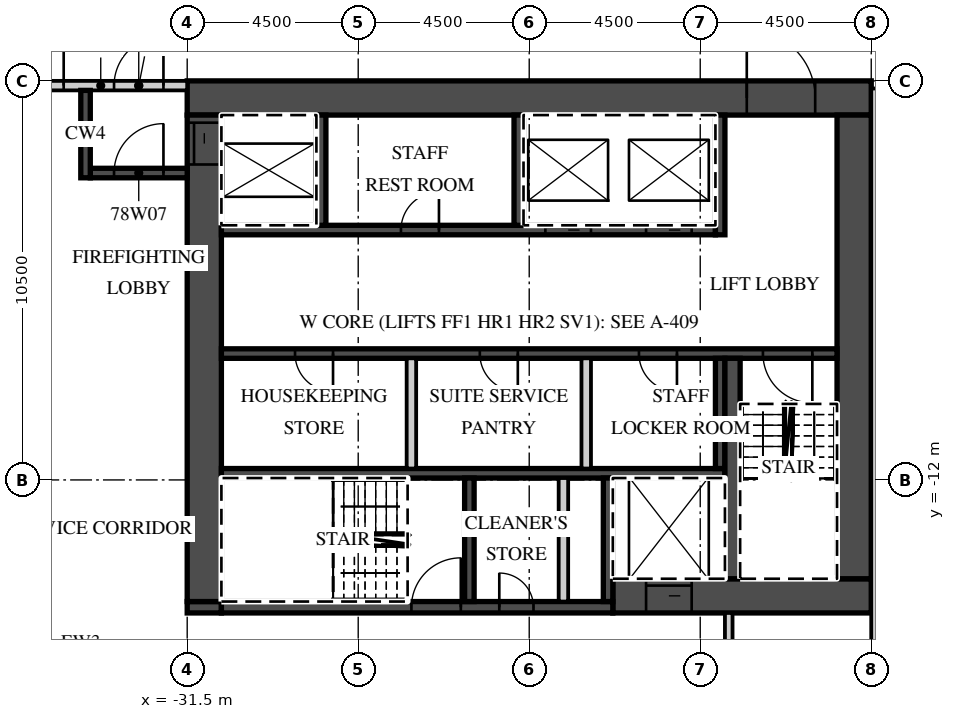
"""IFC4 building model, lengths in metres.
Left out: names, types, materials, properties, quantities, classifications, styles, units other than length and angle.
Written with IfcOpenShell. Run it as: python <this file> out.ifc"""

import sys

from ifc_helpers import new_model, si_unit, direction, frame, frame_2d, origin, place, context, subcontext, project, spatial, rectangle, extrude, element, fill, save


model = new_model("IFC4")
c1 = context("Model", 3, precision=1e-05, world=origin(), true_north=direction((0.0, 1.0)))
c2 = subcontext(c1, "Body", "Model", "MODEL_VIEW")
j1 = project(units=[si_unit("LENGTHUNIT", "METRE"), si_unit("PLANEANGLEUNIT", "RADIAN")], contexts=[c1])
p1 = place(None, origin())
s1 = spatial("IfcSite", under=j1, at=p1, CompositionType="ELEMENT")
p2 = place(p1, origin())
s2 = spatial("IfcBuilding", under=s1, at=p2, CompositionType="ELEMENT")
p3 = place(p2, frame((0.0, 0.0, 308.1)))
s3 = spatial("IfcBuildingStorey", under=s2, at=p3, CompositionType="ELEMENT", Elevation=308.1)
p4 = place(p3, frame((-31.5, -1.95, 0.0), z_axis=(0.0, 0.0, 1.0), x_axis=(1.0, 0.0, 0.0)))
e1 = element("IfcWall", 1, at=p4, inside=s3, PredefinedType="SHEAR", context=c2, shape_type="SweptSolid", body=[
    extrude(rectangle(XDim=18.0, YDim=0.9, at=frame_2d((9.0, 0.0))), origin(), (0.0, 0.0, 1.0), 5.1),
])
p5 = place(p4, frame((14.725, 0.0, 0.0)))
e2 = element("IfcOpeningElement", 2, at=p5, cuts=e1, PredefinedType="OPENING", context=c2, shape_type="SweptSolid", body=[
    extrude(rectangle(XDim=1.8, YDim=2.1, at=frame_2d((0.9, 1.05))), frame((0.0, 0.46, 0.0), z_axis=(0.0, -1.0, 0.0), x_axis=(1.0, 0.0, 0.0)), (0.0, 0.0, 1.0), 0.92),
])
p6 = place(p3, frame((-20.3, -15.05, 0.0), z_axis=(0.0, 0.0, 1.0), x_axis=(1.0, 0.0, 0.0)))
e3 = element("IfcWall", 3, at=p6, inside=s3, PredefinedType="SHEAR", context=c2, shape_type="SweptSolid", body=[
    extrude(rectangle(XDim=6.8, YDim=0.9, at=frame_2d((3.4, 0.0))), origin(), (0.0, 0.0, 1.0), 5.1),
])
p7 = place(p6, frame((0.875, 0.0, 0.0)))
e4 = element("IfcOpeningElement", 4, at=p7, cuts=e3, PredefinedType="OPENING", context=c2, shape_type="SweptSolid", body=[
    extrude(rectangle(XDim=1.2, YDim=2.1, at=frame_2d((0.6, 1.05))), frame((0.0, 0.46, 0.0), z_axis=(0.0, -1.0, 0.0), x_axis=(1.0, 0.0, 0.0)), (0.0, 0.0, 1.0), 0.92),
])
p8 = place(p3, frame((-31.5, -15.35, 0.0), z_axis=(0.0, 0.0, 1.0), x_axis=(1.0, 0.0, 0.0)))
e5 = element("IfcWall", 5, at=p8, inside=s3, PredefinedType="SHEAR", context=c2, shape_type="SweptSolid", body=[
    extrude(rectangle(XDim=0.9, YDim=0.3, at=frame_2d((0.45, 0.0))), origin(), (0.0, 0.0, 1.0), 5.1),
])
p9 = place(p3, frame((-30.6, -15.35, 0.0), z_axis=(0.0, 0.0, 1.0), x_axis=(1.0, 0.0, 0.0)))
e6 = element("IfcWall", 6, at=p9, inside=s3, PredefinedType="SHEAR", context=c2, shape_type="SweptSolid", body=[
    extrude(rectangle(XDim=10.3, YDim=0.3, at=frame_2d((5.15, 0.0))), origin(), (0.0, 0.0, 1.0), 5.1),
])
p10 = place(p9, frame((5.0, 0.0, 0.0)))
e7 = element("IfcOpeningElement", 7, at=p10, cuts=e6, PredefinedType="OPENING", context=c2, shape_type="SweptSolid", body=[
    extrude(rectangle(XDim=1.3, YDim=2.1, at=frame_2d((0.65, 1.05))), frame((0.0, 0.16, 0.0), z_axis=(0.0, -1.0, 0.0), x_axis=(1.0, 0.0, 0.0)), (0.0, 0.0, 1.0), 0.32),
])
p11 = place(p9, frame((7.312, 0.0, 0.0)))
e8 = element("IfcOpeningElement", 8, at=p11, cuts=e6, PredefinedType="OPENING", context=c2, shape_type="SweptSolid", body=[
    extrude(rectangle(XDim=0.9, YDim=2.1, at=frame_2d((0.45, 1.05))), frame((0.0, 0.16, 0.0), z_axis=(0.0, -1.0, 0.0), x_axis=(1.0, 0.0, 0.0)), (0.0, 0.0, 1.0), 0.32),
])
p12 = place(p3, frame((-31.05, -15.2, 0.0), z_axis=(0.0, 0.0, 1.0), x_axis=(0.0, 1.0, 0.0)))
e9 = element("IfcWall", 9, at=p12, inside=s3, PredefinedType="SHEAR", context=c2, shape_type="SweptSolid", body=[
    extrude(rectangle(XDim=12.8, YDim=0.9, at=frame_2d((6.4, 0.0))), origin(), (0.0, 0.0, 1.0), 5.1),
])
p13 = place(p12, frame((11.5, 0.0, 0.0)))
e10 = element("IfcOpeningElement", 10, at=p13, cuts=e9, PredefinedType="OPENING", context=c2, shape_type="SweptSolid", body=[
    extrude(rectangle(XDim=1.1, YDim=2.1, at=frame_2d((0.55, 1.05))), frame((0.0, 0.46, 0.0), z_axis=(0.0, -1.0, 0.0), x_axis=(1.0, 0.0, 0.0)), (0.0, 0.0, 1.0), 0.92),
])
p14 = place(p3, frame((-13.95, -14.6, 0.0), z_axis=(0.0, 0.0, 1.0), x_axis=(0.0, 1.0, 0.0)))
e11 = element("IfcWall", 11, at=p14, inside=s3, PredefinedType="SHEAR", context=c2, shape_type="SweptSolid", body=[
    extrude(rectangle(XDim=12.2, YDim=0.9, at=frame_2d((6.1, 0.0))), origin(), (0.0, 0.0, 1.0), 5.1),
])
p15 = place(p3, frame((-30.6, -5.425, 0.0), z_axis=(0.0, 0.0, 1.0), x_axis=(1.0, 0.0, 0.0)))
e12 = element("IfcWall", 12, at=p15, inside=s3, PredefinedType="SHEAR", context=c2, shape_type="SweptSolid", body=[
    extrude(rectangle(XDim=13.0, YDim=0.25, at=frame_2d((6.5, 0.0))), origin(), (0.0, 0.0, 1.0), 5.1),
])
p16 = place(p15, frame((8.525, 0.0, 0.0)))
e13 = element("IfcOpeningElement", 13, at=p16, cuts=e12, PredefinedType="OPENING", context=c2, shape_type="SweptSolid", body=[
    extrude(rectangle(XDim=1.2, YDim=2.1, at=frame_2d((0.6, 1.05))), frame((0.0, 0.135, 0.0), z_axis=(0.0, -1.0, 0.0), x_axis=(1.0, 0.0, 0.0)), (0.0, 0.0, 1.0), 0.27),
])
p17 = place(p15, frame((11.175, 0.0, 0.0)))
e14 = element("IfcOpeningElement", 14, at=p17, cuts=e12, PredefinedType="OPENING", context=c2, shape_type="SweptSolid", body=[
    extrude(rectangle(XDim=1.2, YDim=2.1, at=frame_2d((0.6, 1.05))), frame((0.0, 0.135, 0.0), z_axis=(0.0, -1.0, 0.0), x_axis=(1.0, 0.0, 0.0)), (0.0, 0.0, 1.0), 0.27),
])
p18 = place(p15, frame((4.725, 0.0, 0.0)))
e15 = element("IfcOpeningElement", 15, at=p18, cuts=e12, PredefinedType="OPENING", context=c2, shape_type="SweptSolid", body=[
    extrude(rectangle(XDim=1.0, YDim=2.1, at=frame_2d((0.5, 1.05))), frame((0.0, 0.135, 0.0), z_axis=(0.0, -1.0, 0.0), x_axis=(1.0, 0.0, 0.0)), (0.0, 0.0, 1.0), 0.27),
])
p19 = place(p3, frame((-17.475, -5.55, 0.0), z_axis=(0.0, 0.0, 1.0), x_axis=(0.0, 1.0, 0.0)))
e16 = element("IfcWall", 16, at=p19, inside=s3, PredefinedType="SHEAR", context=c2, shape_type="SweptSolid", body=[
    extrude(rectangle(XDim=3.15, YDim=0.25, at=frame_2d((1.575, 0.0))), origin(), (0.0, 0.0, 1.0), 5.1),
])
for number, where, z_axis, x_axis in (
    (17, (-27.975, -5.3, 0.0), (0.0, 0.0, 1.0), (0.0, 1.0, 0.0)),
    (18, (-22.775, -5.3, 0.0), (0.0, 0.0, 1.0), (0.0, 1.0, 0.0)),
):
    element("IfcWall", number, at=place(p3, frame(where, z_axis=z_axis, x_axis=x_axis)), inside=s3, PredefinedType="SHEAR", context=c2, shape_type="SweptSolid", body=[
        extrude(rectangle(XDim=2.9, YDim=0.25, at=frame_2d((1.45, 0.0))), origin(), (0.0, 0.0, 1.0), 5.1),
    ])
p20 = place(p3, frame((-30.6, -8.675, 0.0), z_axis=(0.0, 0.0, 1.0), x_axis=(1.0, 0.0, 0.0)))
e19 = element("IfcWall", 19, at=p20, inside=s3, PredefinedType="SHEAR", context=c2, shape_type="SweptSolid", body=[
    extrude(rectangle(XDim=16.2, YDim=0.25, at=frame_2d((8.1, 0.0))), origin(), (0.0, 0.0, 1.0), 5.1),
])
p21 = place(p20, frame((14.25, 0.0, 0.0)))
e20 = element("IfcOpeningElement", 20, at=p21, cuts=e19, PredefinedType="OPENING", context=c2, shape_type="SweptSolid", body=[
    extrude(rectangle(XDim=1.3, YDim=2.1, at=frame_2d((0.65, 1.05))), frame((0.0, 0.135, 0.0), z_axis=(0.0, -1.0, 0.0), x_axis=(1.0, 0.0, 0.0)), (0.0, 0.0, 1.0), 0.27),
])
p22 = place(p20, frame((1.938, 0.0, 0.0)))
e21 = element("IfcOpeningElement", 21, at=p22, cuts=e19, PredefinedType="OPENING", context=c2, shape_type="SweptSolid", body=[
    extrude(rectangle(XDim=1.0, YDim=2.1, at=frame_2d((0.5, 1.05))), frame((0.0, 0.135, 0.0), z_axis=(0.0, -1.0, 0.0), x_axis=(1.0, 0.0, 0.0)), (0.0, 0.0, 1.0), 0.27),
])
p23 = place(p20, frame((6.8, 0.0, 0.0)))
e22 = element("IfcOpeningElement", 22, at=p23, cuts=e19, PredefinedType="OPENING", context=c2, shape_type="SweptSolid", body=[
    extrude(rectangle(XDim=1.0, YDim=2.1, at=frame_2d((0.5, 1.05))), frame((0.0, 0.135, 0.0), z_axis=(0.0, -1.0, 0.0), x_axis=(1.0, 0.0, 0.0)), (0.0, 0.0, 1.0), 0.27),
])
p24 = place(p20, frame((10.988, 0.0, 0.0)))
e23 = element("IfcOpeningElement", 23, at=p24, cuts=e19, PredefinedType="OPENING", context=c2, shape_type="SweptSolid", body=[
    extrude(rectangle(XDim=1.0, YDim=2.1, at=frame_2d((0.5, 1.05))), frame((0.0, 0.135, 0.0), z_axis=(0.0, -1.0, 0.0), x_axis=(1.0, 0.0, 0.0)), (0.0, 0.0, 1.0), 0.27),
])
p25 = place(p3, frame((-30.6, -11.825, 0.0), z_axis=(0.0, 0.0, 1.0), x_axis=(1.0, 0.0, 0.0)))
e24 = element("IfcWall", 24, at=p25, inside=s3, PredefinedType="SHEAR", context=c2, shape_type="SweptSolid", body=[
    extrude(rectangle(XDim=13.25, YDim=0.25, at=frame_2d((6.625, 0.0))), origin(), (0.0, 0.0, 1.0), 5.1),
])
p26 = place(p3, frame((-17.475, -11.7, 0.0), z_axis=(0.0, 0.0, 1.0), x_axis=(0.0, 1.0, 0.0)))
e25 = element("IfcWall", 25, at=p26, inside=s3, PredefinedType="SHEAR", context=c2, shape_type="SweptSolid", body=[
    extrude(rectangle(XDim=2.9, YDim=0.25, at=frame_2d((1.45, 0.0))), origin(), (0.0, 0.0, 1.0), 5.1),
])
for number, where, z_axis, x_axis in (
    (26, (-25.6, -11.7, 0.0), (0.0, 0.0, 1.0), (0.0, 1.0, 0.0)),
    (27, (-21.0, -11.7, 0.0), (0.0, 0.0, 1.0), (0.0, 1.0, 0.0)),
):
    element("IfcWall", number, at=place(p3, frame(where, z_axis=z_axis, x_axis=x_axis)), inside=s3, PredefinedType="PARTITIONING", context=c2, shape_type="SweptSolid", body=[
        extrude(rectangle(XDim=2.9, YDim=0.25, at=frame_2d((1.45, 0.0))), origin(), (0.0, 0.0, 1.0), 5.1),
    ])
p27 = place(p3, frame((-17.15, -14.6, 0.0), z_axis=(0.0, 0.0, 1.0), x_axis=(0.0, 1.0, 0.0)))
e28 = element("IfcWall", 28, at=p27, inside=s3, PredefinedType="SHEAR", context=c2, shape_type="SweptSolid", body=[
    extrude(rectangle(XDim=5.8, YDim=0.4, at=frame_2d((2.9, 0.0))), origin(), (0.0, 0.0, 1.0), 5.1),
])
for number, where, z_axis, x_axis in (
    (29, (-20.425, -15.2, 0.0), (0.0, 0.0, 1.0), (0.0, 1.0, 0.0)),
    (30, (-24.075, -15.2, 0.0), (0.0, 0.0, 1.0), (0.0, 1.0, 0.0)),
):
    element("IfcWall", number, at=place(p3, frame(where, z_axis=z_axis, x_axis=x_axis)), inside=s3, PredefinedType="SHEAR", context=c2, shape_type="SweptSolid", body=[
        extrude(rectangle(XDim=3.25, YDim=0.25, at=frame_2d((1.625, 0.0))), origin(), (0.0, 0.0, 1.0), 5.1),
    ])
p28 = place(p3, frame((-21.6, -15.2, 0.0), z_axis=(0.0, 0.0, 1.0), x_axis=(0.0, 1.0, 0.0)))
e31 = element("IfcWall", 31, at=p28, inside=s3, PredefinedType="PARTITIONING", context=c2, shape_type="SweptSolid", body=[
    extrude(rectangle(XDim=3.25, YDim=0.25, at=frame_2d((1.625, 0.0))), origin(), (0.0, 0.0, 1.0), 5.1),
])
p29 = place(p3, frame((-36.05, -1.625, 0.0), z_axis=(0.0, 0.0, 1.0), x_axis=(1.0, 0.0, 0.0)))
e32 = element("IfcWall", 32, at=p29, inside=s3, PredefinedType="PARTITIONING", context=c2, shape_type="SweptSolid", body=[
    extrude(rectangle(XDim=4.55, YDim=0.25, at=frame_2d((2.275, 0.0))), origin(), (0.0, 0.0, 1.0), 5.1),
])
p30 = place(p29, frame((2.625, 0.0, 0.0)))
e33 = element("IfcOpeningElement", 33, at=p30, cuts=e32, PredefinedType="OPENING", context=c2, shape_type="SweptSolid", body=[
    extrude(rectangle(XDim=1.3, YDim=2.1, at=frame_2d((0.65, 1.05))), frame((0.0, 0.135, 0.0), z_axis=(0.0, -1.0, 0.0), x_axis=(1.0, 0.0, 0.0)), (0.0, 0.0, 1.0), 0.27),
])
p31 = place(p29, frame((0.2, 0.0, 0.0)))
e34 = element("IfcOpeningElement", 34, at=p31, cuts=e32, PredefinedType="OPENING", context=c2, shape_type="SweptSolid", body=[
    extrude(rectangle(XDim=1.1, YDim=2.1, at=frame_2d((0.55, 1.05))), frame((0.0, 0.135, 0.0), z_axis=(0.0, -1.0, 0.0), x_axis=(1.0, 0.0, 0.0)), (0.0, 0.0, 1.0), 0.27),
])
p32 = place(p3, frame((-34.05, -3.925, 0.0), z_axis=(0.0, 0.0, 1.0), x_axis=(1.0, 0.0, 0.0)))
e35 = element("IfcWall", 35, at=p32, inside=s3, PredefinedType="SHEAR", context=c2, shape_type="SweptSolid", body=[
    extrude(rectangle(XDim=2.55, YDim=0.25, at=frame_2d((1.275, 0.0))), origin(), (0.0, 0.0, 1.0), 5.1),
])
p33 = place(p32, frame((0.625, 0.0, 0.0)))
e36 = element("IfcOpeningElement", 36, at=p33, cuts=e35, PredefinedType="OPENING", context=c2, shape_type="SweptSolid", body=[
    extrude(rectangle(XDim=1.3, YDim=2.1, at=frame_2d((0.65, 1.05))), frame((0.0, 0.135, 0.0), z_axis=(0.0, -1.0, 0.0), x_axis=(1.0, 0.0, 0.0)), (0.0, 0.0, 1.0), 0.27),
])
p34 = place(p3, frame((-34.175, -4.05, 0.0), z_axis=(0.0, 0.0, 1.0), x_axis=(0.0, 1.0, 0.0)))
e37 = element("IfcWall", 37, at=p34, inside=s3, PredefinedType="SHEAR", context=c2, shape_type="SweptSolid", body=[
    extrude(rectangle(XDim=2.3, YDim=0.25, at=frame_2d((1.15, 0.0))), origin(), (0.0, 0.0, 1.0), 5.1),
])
p35 = place(p3, frame((-17.25, -18.05, 0.0), z_axis=(0.0, 0.0, 1.0), x_axis=(0.0, 1.0, 0.0)))
e38 = element("IfcWall", 38, at=p35, inside=s3, PredefinedType="PARTITIONING", context=c2, shape_type="SweptSolid", body=[
    extrude(rectangle(XDim=2.55, YDim=0.2, at=frame_2d((1.275, 0.0))), origin(), (0.0, 0.0, 1.0), 5.1),
])
p36 = place(p3, frame((-13.4, -18.05, 0.0), z_axis=(0.0, 0.0, 1.0), x_axis=(0.0, 1.0, 0.0)))
e39 = element("IfcWall", 39, at=p36, inside=s3, PredefinedType="PARTITIONING", context=c2, shape_type="SweptSolid", body=[
    extrude(rectangle(XDim=16.35, YDim=0.2, at=frame_2d((8.175, 0.0))), origin(), (0.0, 0.0, 1.0), 5.1),
])
p37 = place(p16, origin())
e40 = element("IfcDoor", 40, at=p37, inside=s3, OperationType="SLIDING_TO_LEFT", PredefinedType="DOOR", context=c2, shape_type="SweptSolid", body=[
    extrude(rectangle(XDim=1.2, YDim=2.1, at=frame_2d((0.6, 1.05))), frame((0.0, 0.025, 0.0), z_axis=(0.0, -1.0, 0.0), x_axis=(1.0, 0.0, 0.0)), (0.0, 0.0, 1.0), 0.05),
])
fill(e13, e40)
p38 = place(p17, origin())
e41 = element("IfcDoor", 41, at=p38, inside=s3, OperationType="SLIDING_TO_RIGHT", PredefinedType="DOOR", context=c2, shape_type="SweptSolid", body=[
    extrude(rectangle(XDim=1.2, YDim=2.1, at=frame_2d((0.6, 1.05))), frame((0.0, 0.025, 0.0), z_axis=(0.0, -1.0, 0.0), x_axis=(1.0, 0.0, 0.0)), (0.0, 0.0, 1.0), 0.05),
])
fill(e14, e41)
p39 = place(p7, origin())
e42 = element("IfcDoor", 42, at=p39, inside=s3, OperationType="SLIDING_TO_LEFT", PredefinedType="DOOR", context=c2, shape_type="SweptSolid", body=[
    extrude(rectangle(XDim=1.2, YDim=2.1, at=frame_2d((0.6, 1.05))), frame((0.0, 0.025, 0.0), z_axis=(0.0, -1.0, 0.0), x_axis=(1.0, 0.0, 0.0)), (0.0, 0.0, 1.0), 0.05),
])
fill(e4, e42)
p40 = place(p13, origin())
e43 = element("IfcDoor", 43, at=p40, inside=s3, OperationType="SLIDING_TO_RIGHT", PredefinedType="DOOR", context=c2, shape_type="SweptSolid", body=[
    extrude(rectangle(XDim=1.1, YDim=2.1, at=frame_2d((0.55, 1.05))), frame((0.0, 0.025, 0.0), z_axis=(0.0, -1.0, 0.0), x_axis=(1.0, 0.0, 0.0)), (0.0, 0.0, 1.0), 0.05),
])
fill(e10, e43)
p41 = place(p5, origin())
e44 = element("IfcDoor", 44, at=p41, inside=s3, OperationType="DOUBLE_DOOR_DOUBLE_SWING", PredefinedType="DOOR", context=c2, shape_type="SweptSolid", body=[
    extrude(rectangle(XDim=1.8, YDim=2.1, at=frame_2d((0.9, 1.05))), frame((0.0, 0.025, 0.0), z_axis=(0.0, -1.0, 0.0), x_axis=(1.0, 0.0, 0.0)), (0.0, 0.0, 1.0), 0.05),
])
fill(e2, e44)
p42 = place(p30, origin())
e45 = element("IfcDoor", 45, at=p42, inside=s3, OperationType="SINGLE_SWING_RIGHT", PredefinedType="DOOR", context=c2, shape_type="SweptSolid", body=[
    extrude(rectangle(XDim=1.3, YDim=2.1, at=frame_2d((0.65, 1.05))), frame((0.0, 0.025, 0.0), z_axis=(0.0, -1.0, 0.0), x_axis=(1.0, 0.0, 0.0)), (0.0, 0.0, 1.0), 0.05),
])
fill(e33, e45)
p43 = place(p33, origin())
e46 = element("IfcDoor", 46, at=p43, inside=s3, OperationType="SINGLE_SWING_RIGHT", PredefinedType="DOOR", context=c2, shape_type="SweptSolid", body=[
    extrude(rectangle(XDim=1.3, YDim=2.1, at=frame_2d((0.65, 1.05))), frame((0.0, 0.025, 0.0), z_axis=(0.0, -1.0, 0.0), x_axis=(1.0, 0.0, 0.0)), (0.0, 0.0, 1.0), 0.05),
])
fill(e36, e46)
p44 = place(p31, origin())
e47 = element("IfcDoor", 47, at=p44, inside=s3, OperationType="SINGLE_SWING_RIGHT", PredefinedType="DOOR", context=c2, shape_type="SweptSolid", body=[
    extrude(rectangle(XDim=1.1, YDim=2.1, at=frame_2d((0.55, 1.05))), frame((0.0, 0.025, 0.0), z_axis=(0.0, -1.0, 0.0), x_axis=(1.0, 0.0, 0.0)), (0.0, 0.0, 1.0), 0.05),
])
fill(e34, e47)
p45 = place(p21, origin())
e48 = element("IfcDoor", 48, at=p45, inside=s3, OperationType="SINGLE_SWING_RIGHT", PredefinedType="DOOR", context=c2, shape_type="SweptSolid", body=[
    extrude(rectangle(XDim=1.3, YDim=2.1, at=frame_2d((0.65, 1.05))), frame((0.0, 0.025, 0.0), z_axis=(0.0, -1.0, 0.0), x_axis=(1.0, 0.0, 0.0)), (0.0, 0.0, 1.0), 0.05),
])
fill(e20, e48)
p46 = place(p10, origin())
e49 = element("IfcDoor", 49, at=p46, inside=s3, OperationType="SINGLE_SWING_RIGHT", PredefinedType="DOOR", context=c2, shape_type="SweptSolid", body=[
    extrude(rectangle(XDim=1.3, YDim=2.1, at=frame_2d((0.65, 1.05))), frame((0.0, 0.025, 0.0), z_axis=(0.0, -1.0, 0.0), x_axis=(1.0, 0.0, 0.0)), (0.0, 0.0, 1.0), 0.05),
])
fill(e7, e49)
p47 = place(p11, origin())
e50 = element("IfcDoor", 50, at=p47, inside=s3, OperationType="SINGLE_SWING_LEFT", PredefinedType="DOOR", context=c2, shape_type="SweptSolid", body=[
    extrude(rectangle(XDim=0.9, YDim=2.1, at=frame_2d((0.45, 1.05))), frame((0.0, 0.025, 0.0), z_axis=(0.0, -1.0, 0.0), x_axis=(1.0, 0.0, 0.0)), (0.0, 0.0, 1.0), 0.05),
])
fill(e8, e50)
p48 = place(p22, origin())
e51 = element("IfcDoor", 51, at=p48, inside=s3, OperationType="SINGLE_SWING_RIGHT", PredefinedType="DOOR", context=c2, shape_type="SweptSolid", body=[
    extrude(rectangle(XDim=1.0, YDim=2.1, at=frame_2d((0.5, 1.05))), frame((0.0, 0.025, 0.0), z_axis=(0.0, -1.0, 0.0), x_axis=(1.0, 0.0, 0.0)), (0.0, 0.0, 1.0), 0.05),
])
fill(e21, e51)
p49 = place(p23, origin())
e52 = element("IfcDoor", 52, at=p49, inside=s3, OperationType="SINGLE_SWING_RIGHT", PredefinedType="DOOR", context=c2, shape_type="SweptSolid", body=[
    extrude(rectangle(XDim=1.0, YDim=2.1, at=frame_2d((0.5, 1.05))), frame((0.0, 0.025, 0.0), z_axis=(0.0, -1.0, 0.0), x_axis=(1.0, 0.0, 0.0)), (0.0, 0.0, 1.0), 0.05),
])
fill(e22, e52)
p50 = place(p24, origin())
e53 = element("IfcDoor", 53, at=p50, inside=s3, OperationType="SINGLE_SWING_RIGHT", PredefinedType="DOOR", context=c2, shape_type="SweptSolid", body=[
    extrude(rectangle(XDim=1.0, YDim=2.1, at=frame_2d((0.5, 1.05))), frame((0.0, 0.025, 0.0), z_axis=(0.0, -1.0, 0.0), x_axis=(1.0, 0.0, 0.0)), (0.0, 0.0, 1.0), 0.05),
])
fill(e23, e53)
p51 = place(p18, origin())
e54 = element("IfcDoor", 54, at=p51, inside=s3, OperationType="SINGLE_SWING_RIGHT", PredefinedType="DOOR", context=c2, shape_type="SweptSolid", body=[
    extrude(rectangle(XDim=1.0, YDim=2.1, at=frame_2d((0.5, 1.05))), frame((0.0, 0.025, 0.0), z_axis=(0.0, -1.0, 0.0), x_axis=(1.0, 0.0, 0.0)), (0.0, 0.0, 1.0), 0.05),
])
fill(e15, e54)
save(model, sys.argv[1])
